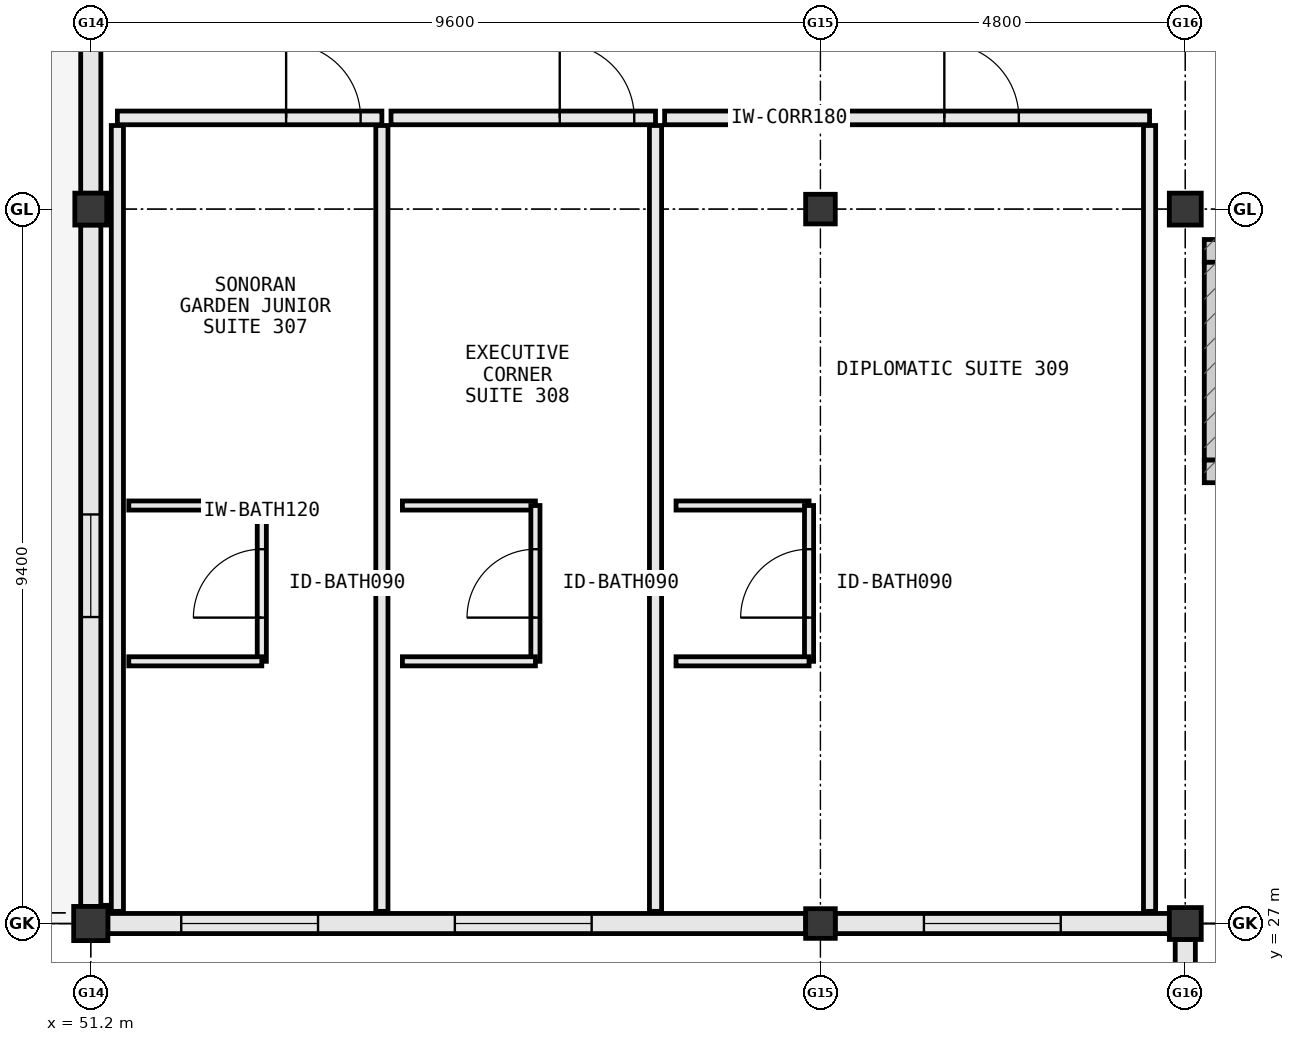
"""IFC4 building model, lengths in metres.
Left out: names, types, materials, properties, quantities, classifications, styles, units other than length and angle.
Written with IfcOpenShell. Run it as: python <this file> out.ifc"""

import sys

from ifc_helpers import new_model, si_unit, direction, frame, frame_2d, origin, origin_2d, place, context, subcontext, project, spatial, rectangle, extrude, element, fill, save


model = new_model("IFC4")
c1 = context("Model", 3, precision=1e-05, world=origin(), true_north=direction((0.0, 1.0)))
c2 = subcontext(c1, "Body", "Model", "MODEL_VIEW")
j1 = project(units=[si_unit("LENGTHUNIT", "METRE"), si_unit("PLANEANGLEUNIT", "RADIAN")], contexts=[c1])
p1 = place(None, origin())
s1 = spatial("IfcSite", under=j1, at=p1, CompositionType="ELEMENT")
p2 = place(p1, origin())
s2 = spatial("IfcBuilding", under=s1, at=p2, CompositionType="ELEMENT")
p3 = place(p2, frame((0.0, 0.0, 46.6)))
s3 = spatial("IfcBuildingStorey", under=s2, at=p3, CompositionType="ELEMENT", Elevation=46.6)
for number, where, z_axis, x_axis in (
    (1, (60.8, 27.0, 0.0), (0.0, 0.0, 1.0), (1.0, 0.0, 0.0)),
    (2, (60.8, 36.4, 0.0), (0.0, 0.0, 1.0), (1.0, 0.0, 0.0)),
):
    element("IfcColumn", number, at=place(p3, frame(where, z_axis=z_axis, x_axis=x_axis)), inside=s3, PredefinedType="COLUMN", context=c2, shape_type="SweptSolid", body=[
        extrude(rectangle(XDim=0.39, YDim=0.39, at=origin_2d()), origin(), (0.0, 0.0, 1.0), 4.2),
    ])
for number, where, z_axis, x_axis in (
    (3, (65.6, 27.0, 0.0), (0.0, 0.0, 1.0), (1.0, 0.0, 0.0)),
    (4, (65.6, 36.4, 0.0), (0.0, 0.0, 1.0), (1.0, 0.0, 0.0)),
):
    element("IfcColumn", number, at=place(p3, frame(where, z_axis=z_axis, x_axis=x_axis)), inside=s3, PredefinedType="COLUMN", context=c2, shape_type="SweptSolid", body=[
        extrude(rectangle(XDim=0.42, YDim=0.42, at=origin_2d()), origin(), (0.0, 0.0, 1.0), 4.2),
    ])
p4 = place(p3, frame((51.2, 27.0, 0.0), z_axis=(0.0, 0.0, 1.0), x_axis=(1.0, 0.0, 0.0)))
e5 = element("IfcColumn", 5, at=p4, inside=s3, PredefinedType="COLUMN", context=c2, shape_type="SweptSolid", body=[
    extrude(rectangle(XDim=0.45, YDim=0.45, at=origin_2d()), origin(), (0.0, 0.0, 1.0), 4.2),
])
p5 = place(p3, frame((51.2, 36.4, 0.0), z_axis=(0.0, 0.0, 1.0), x_axis=(1.0, 0.0, 0.0)))
e6 = element("IfcColumn", 6, at=p5, inside=s3, PredefinedType="COLUMN", context=c2, shape_type="SweptSolid", body=[
    extrude(rectangle(XDim=0.42, YDim=0.42, at=origin_2d()), origin(), (0.0, 0.0, 1.0), 4.2),
])
p6 = place(p3, frame((51.2, 46.992, 0.0), z_axis=(0.0, 0.0, 1.0), x_axis=(0.0, -1.0, 0.0)))
e7 = element("IfcWall", 7, at=p6, inside=s3, PredefinedType="STANDARD", context=c2, shape_type="SweptSolid", body=[
    extrude(rectangle(XDim=10.384, YDim=0.265, at=frame_2d((5.192, 0.0))), origin(), (0.0, 0.0, 1.0), 3.99),
])
p7 = place(p6, frame((1.921, 0.0, 0.85)))
e8 = element("IfcOpeningElement", 8, at=p7, cuts=e7, PredefinedType="OPENING", context=c2, shape_type="SweptSolid", body=[
    extrude(rectangle(XDim=1.35, YDim=1.65, at=frame_2d((0.675, 0.825))), frame((0.0, 0.145, 0.0), z_axis=(0.0, -1.0, 0.0), x_axis=(1.0, 0.0, 0.0)), (0.0, 0.0, 1.0), 0.289),
])
p8 = place(p6, frame((7.113, 0.0, 0.85)))
e9 = element("IfcOpeningElement", 9, at=p8, cuts=e7, PredefinedType="OPENING", context=c2, shape_type="SweptSolid", body=[
    extrude(rectangle(XDim=1.35, YDim=1.65, at=frame_2d((0.675, 0.825))), frame((0.0, 0.145, 0.0), z_axis=(0.0, -1.0, 0.0), x_axis=(1.0, 0.0, 0.0)), (0.0, 0.0, 1.0), 0.289),
])
p9 = place(p3, frame((51.2, 36.192, 0.0), z_axis=(0.0, 0.0, 1.0), x_axis=(0.0, -1.0, 0.0)))
e10 = element("IfcWall", 10, at=p9, inside=s3, PredefinedType="STANDARD", context=c2, shape_type="SweptSolid", body=[
    extrude(rectangle(XDim=8.969, YDim=0.265, at=frame_2d((4.484, 0.0))), origin(), (0.0, 0.0, 1.0), 3.99),
])
p10 = place(p9, frame((3.81, 0.0, 0.85)))
e11 = element("IfcOpeningElement", 11, at=p10, cuts=e10, PredefinedType="OPENING", context=c2, shape_type="SweptSolid", body=[
    extrude(rectangle(XDim=1.35, YDim=1.65, at=frame_2d((0.675, 0.825))), frame((0.0, 0.145, 0.0), z_axis=(0.0, -1.0, 0.0), x_axis=(1.0, 0.0, 0.0)), (0.0, 0.0, 1.0), 0.289),
])
p11 = place(p3, frame((51.423, 27.0, 0.0), z_axis=(0.0, 0.0, 1.0), x_axis=(1.0, 0.0, 0.0)))
e12 = element("IfcWall", 12, at=p11, inside=s3, PredefinedType="STANDARD", context=c2, shape_type="SweptSolid", body=[
    extrude(rectangle(XDim=9.184, YDim=0.265, at=frame_2d((4.592, 0.0))), origin(), (0.0, 0.0, 1.0), 3.99),
])
p12 = place(p11, frame((0.967, 0.0, 0.85)))
e13 = element("IfcOpeningElement", 13, at=p12, cuts=e12, PredefinedType="OPENING", context=c2, shape_type="SweptSolid", body=[
    extrude(rectangle(XDim=1.8, YDim=1.85, at=frame_2d((0.9, 0.925))), frame((0.0, 0.145, 0.0), z_axis=(0.0, -1.0, 0.0), x_axis=(1.0, 0.0, 0.0)), (0.0, 0.0, 1.0), 0.289),
])
p13 = place(p11, frame((4.567, 0.0, 0.85)))
e14 = element("IfcOpeningElement", 14, at=p13, cuts=e12, PredefinedType="OPENING", context=c2, shape_type="SweptSolid", body=[
    extrude(rectangle(XDim=1.8, YDim=1.85, at=frame_2d((0.9, 0.925))), frame((0.0, 0.145, 0.0), z_axis=(0.0, -1.0, 0.0), x_axis=(1.0, 0.0, 0.0)), (0.0, 0.0, 1.0), 0.289),
])
p14 = place(p3, frame((60.993, 27.0, 0.0), z_axis=(0.0, 0.0, 1.0), x_axis=(1.0, 0.0, 0.0)))
e15 = element("IfcWall", 15, at=p14, inside=s3, PredefinedType="STANDARD", context=c2, shape_type="SweptSolid", body=[
    extrude(rectangle(XDim=4.399, YDim=0.265, at=frame_2d((2.2, 0.0))), origin(), (0.0, 0.0, 1.0), 3.99),
])
p15 = place(p14, frame((1.168, 0.0, 0.85)))
e16 = element("IfcOpeningElement", 16, at=p15, cuts=e15, PredefinedType="OPENING", context=c2, shape_type="SweptSolid", body=[
    extrude(rectangle(XDim=1.8, YDim=1.85, at=frame_2d((0.9, 0.925))), frame((0.0, 0.145, 0.0), z_axis=(0.0, -1.0, 0.0), x_axis=(1.0, 0.0, 0.0)), (0.0, 0.0, 1.0), 0.289),
])
p16 = place(p3, frame((65.6, 26.792, 0.0), z_axis=(0.0, 0.0, 1.0), x_axis=(0.0, -1.0, 0.0)))
e17 = element("IfcWall", 17, at=p16, inside=s3, PredefinedType="STANDARD", context=c2, shape_type="SweptSolid", body=[
    extrude(rectangle(XDim=7.984, YDim=0.265, at=frame_2d((3.992, 0.0))), origin(), (0.0, 0.0, 1.0), 3.99),
])
p17 = place(p16, frame((3.317, 0.0, 0.85)))
e18 = element("IfcOpeningElement", 18, at=p17, cuts=e17, PredefinedType="OPENING", context=c2, shape_type="SweptSolid", body=[
    extrude(rectangle(XDim=1.35, YDim=1.65, at=frame_2d((0.675, 0.825))), frame((0.0, 0.145, 0.0), z_axis=(0.0, -1.0, 0.0), x_axis=(1.0, 0.0, 0.0)), (0.0, 0.0, 1.0), 0.289),
])
p18 = place(p3, frame((65.85, 32.95, 0.0), z_axis=(0.0, 0.0, 1.0), x_axis=(1.0, 0.0, 0.0)))
e19 = element("IfcWall", 19, at=p18, inside=s3, PredefinedType="SHEAR", context=c2, shape_type="SweptSolid", body=[
    extrude(rectangle(XDim=2.9, YDim=0.3, at=frame_2d((1.45, 0.0))), origin(), (0.0, 0.0, 1.0), 3.99),
])
p19 = place(p18, frame((0.85, 0.0, 0.0)))
e20 = element("IfcOpeningElement", 20, at=p19, cuts=e19, PredefinedType="OPENING", context=c2, shape_type="SweptSolid", body=[
    extrude(rectangle(XDim=1.2, YDim=2.2, at=frame_2d((0.6, 1.1))), frame((0.0, 0.162, 0.0), z_axis=(0.0, -1.0, 0.0), x_axis=(1.0, 0.0, 0.0)), (0.0, 0.0, 1.0), 0.324),
])
p20 = place(p3, frame((68.75, 35.85, 0.0), z_axis=(0.0, 0.0, 1.0), x_axis=(-1.0, 0.0, 0.0)))
e21 = element("IfcWall", 21, at=p20, inside=s3, PredefinedType="SHEAR", context=c2, shape_type="SweptSolid", body=[
    extrude(rectangle(XDim=2.9, YDim=0.3, at=frame_2d((1.45, 0.0))), origin(), (0.0, 0.0, 1.0), 3.99),
])
p21 = place(p3, frame((66.0, 35.7, 0.0), z_axis=(0.0, 0.0, 1.0), x_axis=(0.0, -1.0, 0.0)))
e22 = element("IfcWall", 22, at=p21, inside=s3, PredefinedType="SHEAR", context=c2, shape_type="SweptSolid", body=[
    extrude(rectangle(XDim=2.6, YDim=0.3, at=frame_2d((1.3, 0.0))), origin(), (0.0, 0.0, 1.0), 3.99),
])
p22 = place(p3, frame((55.03, 37.6, 0.0), z_axis=(0.0, 0.0, 1.0), x_axis=(-1.0, 0.0, 0.0)))
e23 = element("IfcWall", 23, at=p22, inside=s3, PredefinedType="PARTITIONING", context=c2, shape_type="SweptSolid", body=[
    extrude(rectangle(XDim=3.48, YDim=0.18, at=frame_2d((1.74, 0.0))), origin(), (0.0, 0.0, 1.0), 3.99),
])
p23 = place(p22, frame((0.28, 0.0, 0.0)))
e24 = element("IfcOpeningElement", 24, at=p23, cuts=e23, PredefinedType="OPENING", context=c2, shape_type="SweptSolid", body=[
    extrude(rectangle(XDim=0.98, YDim=2.18, at=frame_2d((0.49, 1.09))), frame((0.0, 0.102, 0.0), z_axis=(0.0, -1.0, 0.0), x_axis=(1.0, 0.0, 0.0)), (0.0, 0.0, 1.0), 0.204),
])
for number, where, z_axis, x_axis in (
    (25, (51.55, 27.16, 0.0), (0.0, 0.0, 1.0), (0.0, 1.0, 0.0)),
    (26, (55.03, 27.16, 0.0), (0.0, 0.0, 1.0), (0.0, 1.0, 0.0)),
):
    element("IfcWall", number, at=place(p3, frame(where, z_axis=z_axis, x_axis=x_axis)), inside=s3, PredefinedType="PARTITIONING", context=c2, shape_type="SweptSolid", body=[
        extrude(rectangle(XDim=10.34, YDim=0.16, at=frame_2d((5.17, 0.0))), origin(), (0.0, 0.0, 1.0), 3.99),
    ])
p24 = place(p3, frame((51.7, 32.5, 0.0), z_axis=(0.0, 0.0, 1.0), x_axis=(1.0, 0.0, 0.0)))
e27 = element("IfcWall", 27, at=p24, inside=s3, PredefinedType="PARTITIONING", context=c2, shape_type="SweptSolid", body=[
    extrude(rectangle(XDim=1.75, YDim=0.12, at=frame_2d((0.875, 0.0))), origin(), (0.0, 0.0, 1.0), 3.99),
])
p25 = place(p3, frame((53.45, 30.45, 0.0), z_axis=(0.0, 0.0, 1.0), x_axis=(0.0, 1.0, 0.0)))
e28 = element("IfcWall", 28, at=p25, inside=s3, PredefinedType="PARTITIONING", context=c2, shape_type="SweptSolid", body=[
    extrude(rectangle(XDim=2.05, YDim=0.12, at=frame_2d((1.025, 0.0))), origin(), (0.0, 0.0, 1.0), 3.99),
])
p26 = place(p25, frame((0.575, 0.0, 0.0)))
e29 = element("IfcOpeningElement", 29, at=p26, cuts=e28, PredefinedType="OPENING", context=c2, shape_type="SweptSolid", body=[
    extrude(rectangle(XDim=0.9, YDim=2.15, at=frame_2d((0.45, 1.075))), frame((0.0, 0.072, 0.0), z_axis=(0.0, -1.0, 0.0), x_axis=(1.0, 0.0, 0.0)), (0.0, 0.0, 1.0), 0.144),
])
p27 = place(p3, frame((51.7, 30.45, 0.0), z_axis=(0.0, 0.0, 1.0), x_axis=(1.0, 0.0, 0.0)))
e30 = element("IfcWall", 30, at=p27, inside=s3, PredefinedType="PARTITIONING", context=c2, shape_type="SweptSolid", body=[
    extrude(rectangle(XDim=1.75, YDim=0.12, at=frame_2d((0.875, 0.0))), origin(), (0.0, 0.0, 1.0), 3.99),
])
p28 = place(p3, frame((58.63, 37.6, 0.0), z_axis=(0.0, 0.0, 1.0), x_axis=(-1.0, 0.0, 0.0)))
e31 = element("IfcWall", 31, at=p28, inside=s3, PredefinedType="PARTITIONING", context=c2, shape_type="SweptSolid", body=[
    extrude(rectangle(XDim=3.48, YDim=0.18, at=frame_2d((1.74, 0.0))), origin(), (0.0, 0.0, 1.0), 3.99),
])
p29 = place(p28, frame((0.28, 0.0, 0.0)))
e32 = element("IfcOpeningElement", 32, at=p29, cuts=e31, PredefinedType="OPENING", context=c2, shape_type="SweptSolid", body=[
    extrude(rectangle(XDim=0.98, YDim=2.18, at=frame_2d((0.49, 1.09))), frame((0.0, 0.102, 0.0), z_axis=(0.0, -1.0, 0.0), x_axis=(1.0, 0.0, 0.0)), (0.0, 0.0, 1.0), 0.204),
])
p30 = place(p3, frame((58.63, 27.16, 0.0), z_axis=(0.0, 0.0, 1.0), x_axis=(0.0, 1.0, 0.0)))
e33 = element("IfcWall", 33, at=p30, inside=s3, PredefinedType="PARTITIONING", context=c2, shape_type="SweptSolid", body=[
    extrude(rectangle(XDim=10.34, YDim=0.16, at=frame_2d((5.17, 0.0))), origin(), (0.0, 0.0, 1.0), 3.99),
])
p31 = place(p3, frame((55.3, 32.5, 0.0), z_axis=(0.0, 0.0, 1.0), x_axis=(1.0, 0.0, 0.0)))
e34 = element("IfcWall", 34, at=p31, inside=s3, PredefinedType="PARTITIONING", context=c2, shape_type="SweptSolid", body=[
    extrude(rectangle(XDim=1.75, YDim=0.12, at=frame_2d((0.875, 0.0))), origin(), (0.0, 0.0, 1.0), 3.99),
])
p32 = place(p3, frame((57.05, 30.45, 0.0), z_axis=(0.0, 0.0, 1.0), x_axis=(0.0, 1.0, 0.0)))
e35 = element("IfcWall", 35, at=p32, inside=s3, PredefinedType="PARTITIONING", context=c2, shape_type="SweptSolid", body=[
    extrude(rectangle(XDim=2.05, YDim=0.12, at=frame_2d((1.025, 0.0))), origin(), (0.0, 0.0, 1.0), 3.99),
])
p33 = place(p32, frame((0.575, 0.0, 0.0)))
e36 = element("IfcOpeningElement", 36, at=p33, cuts=e35, PredefinedType="OPENING", context=c2, shape_type="SweptSolid", body=[
    extrude(rectangle(XDim=0.9, YDim=2.15, at=frame_2d((0.45, 1.075))), frame((0.0, 0.072, 0.0), z_axis=(0.0, -1.0, 0.0), x_axis=(1.0, 0.0, 0.0)), (0.0, 0.0, 1.0), 0.144),
])
p34 = place(p3, frame((55.3, 30.45, 0.0), z_axis=(0.0, 0.0, 1.0), x_axis=(1.0, 0.0, 0.0)))
e37 = element("IfcWall", 37, at=p34, inside=s3, PredefinedType="PARTITIONING", context=c2, shape_type="SweptSolid", body=[
    extrude(rectangle(XDim=1.75, YDim=0.12, at=frame_2d((0.875, 0.0))), origin(), (0.0, 0.0, 1.0), 3.99),
])
p35 = place(p3, frame((65.13, 37.6, 0.0), z_axis=(0.0, 0.0, 1.0), x_axis=(-1.0, 0.0, 0.0)))
e38 = element("IfcWall", 38, at=p35, inside=s3, PredefinedType="PARTITIONING", context=c2, shape_type="SweptSolid", body=[
    extrude(rectangle(XDim=6.38, YDim=0.18, at=frame_2d((3.19, 0.0))), origin(), (0.0, 0.0, 1.0), 3.99),
])
p36 = place(p35, frame((1.72, 0.0, 0.0)))
e39 = element("IfcOpeningElement", 39, at=p36, cuts=e38, PredefinedType="OPENING", context=c2, shape_type="SweptSolid", body=[
    extrude(rectangle(XDim=0.98, YDim=2.18, at=frame_2d((0.49, 1.09))), frame((0.0, 0.102, 0.0), z_axis=(0.0, -1.0, 0.0), x_axis=(1.0, 0.0, 0.0)), (0.0, 0.0, 1.0), 0.204),
])
p37 = place(p3, frame((65.13, 27.16, 0.0), z_axis=(0.0, 0.0, 1.0), x_axis=(0.0, 1.0, 0.0)))
e40 = element("IfcWall", 40, at=p37, inside=s3, PredefinedType="PARTITIONING", context=c2, shape_type="SweptSolid", body=[
    extrude(rectangle(XDim=10.34, YDim=0.16, at=frame_2d((5.17, 0.0))), origin(), (0.0, 0.0, 1.0), 3.99),
])
p38 = place(p3, frame((58.9, 32.5, 0.0), z_axis=(0.0, 0.0, 1.0), x_axis=(1.0, 0.0, 0.0)))
e41 = element("IfcWall", 41, at=p38, inside=s3, PredefinedType="PARTITIONING", context=c2, shape_type="SweptSolid", body=[
    extrude(rectangle(XDim=1.75, YDim=0.12, at=frame_2d((0.875, 0.0))), origin(), (0.0, 0.0, 1.0), 3.99),
])
p39 = place(p3, frame((60.65, 30.45, 0.0), z_axis=(0.0, 0.0, 1.0), x_axis=(0.0, 1.0, 0.0)))
e42 = element("IfcWall", 42, at=p39, inside=s3, PredefinedType="PARTITIONING", context=c2, shape_type="SweptSolid", body=[
    extrude(rectangle(XDim=2.05, YDim=0.12, at=frame_2d((1.025, 0.0))), origin(), (0.0, 0.0, 1.0), 3.99),
])
p40 = place(p39, frame((0.575, 0.0, 0.0)))
e43 = element("IfcOpeningElement", 43, at=p40, cuts=e42, PredefinedType="OPENING", context=c2, shape_type="SweptSolid", body=[
    extrude(rectangle(XDim=0.9, YDim=2.15, at=frame_2d((0.45, 1.075))), frame((0.0, 0.072, 0.0), z_axis=(0.0, -1.0, 0.0), x_axis=(1.0, 0.0, 0.0)), (0.0, 0.0, 1.0), 0.144),
])
p41 = place(p3, frame((58.9, 30.45, 0.0), z_axis=(0.0, 0.0, 1.0), x_axis=(1.0, 0.0, 0.0)))
e44 = element("IfcWall", 44, at=p41, inside=s3, PredefinedType="PARTITIONING", context=c2, shape_type="SweptSolid", body=[
    extrude(rectangle(XDim=1.75, YDim=0.12, at=frame_2d((0.875, 0.0))), origin(), (0.0, 0.0, 1.0), 3.99),
])
p42 = place(p10, origin())
e45 = element("IfcWindow", 45, at=p42, inside=s3, PartitioningType="SINGLE_PANEL", PredefinedType="WINDOW", context=c2, shape_type="SweptSolid", body=[
    extrude(rectangle(XDim=1.35, YDim=1.65, at=frame_2d((0.675, 0.825))), frame((0.0, 0.03, 0.0), z_axis=(0.0, -1.0, 0.0), x_axis=(1.0, 0.0, 0.0)), (0.0, 0.0, 1.0), 0.06),
])
fill(e11, e45)
p43 = place(p12, origin())
e46 = element("IfcWindow", 46, at=p43, inside=s3, PartitioningType="SINGLE_PANEL", PredefinedType="WINDOW", context=c2, shape_type="SweptSolid", body=[
    extrude(rectangle(XDim=1.8, YDim=1.85, at=frame_2d((0.9, 0.925))), frame((0.0, 0.03, 0.0), z_axis=(0.0, -1.0, 0.0), x_axis=(1.0, 0.0, 0.0)), (0.0, 0.0, 1.0), 0.06),
])
fill(e13, e46)
p44 = place(p13, origin())
e47 = element("IfcWindow", 47, at=p44, inside=s3, PartitioningType="SINGLE_PANEL", PredefinedType="WINDOW", context=c2, shape_type="SweptSolid", body=[
    extrude(rectangle(XDim=1.8, YDim=1.85, at=frame_2d((0.9, 0.925))), frame((0.0, 0.03, 0.0), z_axis=(0.0, -1.0, 0.0), x_axis=(1.0, 0.0, 0.0)), (0.0, 0.0, 1.0), 0.06),
])
fill(e14, e47)
p45 = place(p15, origin())
e48 = element("IfcWindow", 48, at=p45, inside=s3, PartitioningType="SINGLE_PANEL", PredefinedType="WINDOW", context=c2, shape_type="SweptSolid", body=[
    extrude(rectangle(XDim=1.8, YDim=1.85, at=frame_2d((0.9, 0.925))), frame((0.0, 0.03, 0.0), z_axis=(0.0, -1.0, 0.0), x_axis=(1.0, 0.0, 0.0)), (0.0, 0.0, 1.0), 0.06),
])
fill(e16, e48)
p46 = place(p23, frame((0.98, 0.0, 0.0), z_axis=(0.0, 0.0, 1.0), x_axis=(-1.0, 0.0, 0.0)))
e49 = element("IfcDoor", 49, at=p46, inside=s3, OperationType="SINGLE_SWING_RIGHT", PredefinedType="DOOR", context=c2, shape_type="SweptSolid", body=[
    extrude(rectangle(XDim=0.98, YDim=2.18, at=frame_2d((0.49, 1.09))), frame((0.0, 0.025, 0.0), z_axis=(0.0, -1.0, 0.0), x_axis=(1.0, 0.0, 0.0)), (0.0, 0.0, 1.0), 0.05),
])
fill(e24, e49)
p47 = place(p26, origin())
e50 = element("IfcDoor", 50, at=p47, inside=s3, OperationType="SINGLE_SWING_LEFT", PredefinedType="DOOR", context=c2, shape_type="SweptSolid", body=[
    extrude(rectangle(XDim=0.9, YDim=2.15, at=frame_2d((0.45, 1.075))), frame((0.0, 0.025, 0.0), z_axis=(0.0, -1.0, 0.0), x_axis=(1.0, 0.0, 0.0)), (0.0, 0.0, 1.0), 0.05),
])
fill(e29, e50)
p48 = place(p29, frame((0.98, 0.0, 0.0), z_axis=(0.0, 0.0, 1.0), x_axis=(-1.0, 0.0, 0.0)))
e51 = element("IfcDoor", 51, at=p48, inside=s3, OperationType="SINGLE_SWING_RIGHT", PredefinedType="DOOR", context=c2, shape_type="SweptSolid", body=[
    extrude(rectangle(XDim=0.98, YDim=2.18, at=frame_2d((0.49, 1.09))), frame((0.0, 0.025, 0.0), z_axis=(0.0, -1.0, 0.0), x_axis=(1.0, 0.0, 0.0)), (0.0, 0.0, 1.0), 0.05),
])
fill(e32, e51)
p49 = place(p33, origin())
e52 = element("IfcDoor", 52, at=p49, inside=s3, OperationType="SINGLE_SWING_LEFT", PredefinedType="DOOR", context=c2, shape_type="SweptSolid", body=[
    extrude(rectangle(XDim=0.9, YDim=2.15, at=frame_2d((0.45, 1.075))), frame((0.0, 0.025, 0.0), z_axis=(0.0, -1.0, 0.0), x_axis=(1.0, 0.0, 0.0)), (0.0, 0.0, 1.0), 0.05),
])
fill(e36, e52)
p50 = place(p36, frame((0.98, 0.0, 0.0), z_axis=(0.0, 0.0, 1.0), x_axis=(-1.0, 0.0, 0.0)))
e53 = element("IfcDoor", 53, at=p50, inside=s3, OperationType="SINGLE_SWING_RIGHT", PredefinedType="DOOR", context=c2, shape_type="SweptSolid", body=[
    extrude(rectangle(XDim=0.98, YDim=2.18, at=frame_2d((0.49, 1.09))), frame((0.0, 0.025, 0.0), z_axis=(0.0, -1.0, 0.0), x_axis=(1.0, 0.0, 0.0)), (0.0, 0.0, 1.0), 0.05),
])
fill(e39, e53)
p51 = place(p40, origin())
e54 = element("IfcDoor", 54, at=p51, inside=s3, OperationType="SINGLE_SWING_LEFT", PredefinedType="DOOR", context=c2, shape_type="SweptSolid", body=[
    extrude(rectangle(XDim=0.9, YDim=2.15, at=frame_2d((0.45, 1.075))), frame((0.0, 0.025, 0.0), z_axis=(0.0, -1.0, 0.0), x_axis=(1.0, 0.0, 0.0)), (0.0, 0.0, 1.0), 0.05),
])
fill(e43, e54)
save(model, sys.argv[1])
